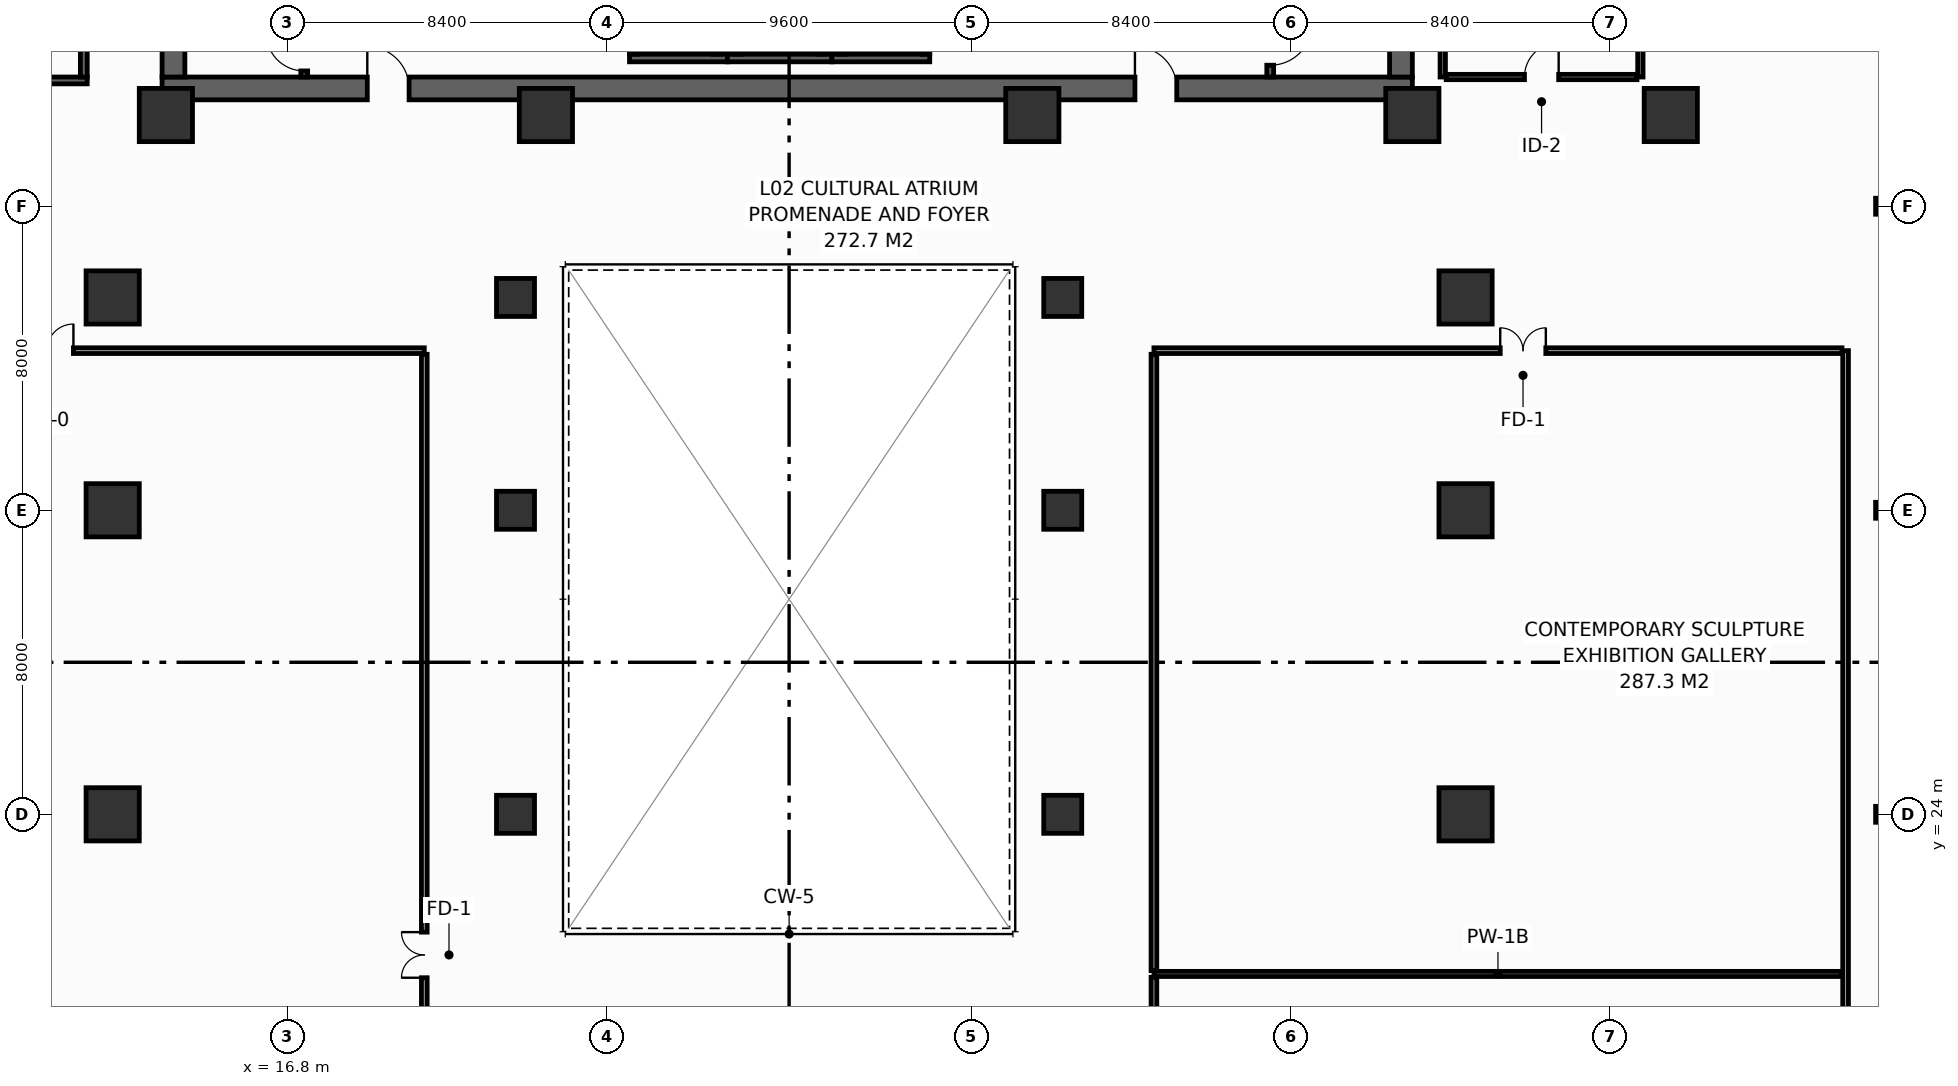
"""IFC4 building model, lengths in metres.
Left out: names, types, materials, properties, quantities, classifications, styles, units other than length and angle.
Written with IfcOpenShell. Run it as: python <this file> out.ifc"""

import sys

from ifc_helpers import new_model, si_unit, direction, frame, frame_2d, origin, origin_2d, place, context, subcontext, project, spatial, rectangle, hollow_rectangle, i_section, extrude, element, fill, save


model = new_model("IFC4")
c1 = context("Model", 3, precision=1e-05, world=origin(), true_north=direction((0.0, 1.0)))
c2 = subcontext(c1, "Body", "Model", "MODEL_VIEW")
j1 = project(units=[si_unit("LENGTHUNIT", "METRE"), si_unit("PLANEANGLEUNIT", "RADIAN")], contexts=[c1])
p1 = place(None, origin())
s1 = spatial("IfcSite", under=j1, at=p1, CompositionType="ELEMENT")
p2 = place(p1, origin())
s2 = spatial("IfcBuilding", under=s1, at=p2, CompositionType="ELEMENT")
p3 = place(p2, frame((0.0, 0.0, 11.4)))
s3 = spatial("IfcBuildingStorey", under=s2, at=p3, CompositionType="ELEMENT", Elevation=11.4)
p4 = place(p3, frame((13.5, 43.1, 0.0), z_axis=(0.0, 0.0, 1.0), x_axis=(1.0, 0.0, 0.0)))
e1 = element("IfcWall", 1, at=p4, inside=s3, PredefinedType="SHEAR", context=c2, shape_type="SweptSolid", body=[
    extrude(rectangle(XDim=32.9, YDim=0.6, at=frame_2d((16.45, 0.0))), origin(), (0.0, 0.0, 1.0), 5.1),
])
p5 = place(p4, frame((5.4, 0.0, 0.0)))
e2 = element("IfcOpeningElement", 2, at=p5, cuts=e1, PredefinedType="OPENING", context=c2, shape_type="SweptSolid", body=[
    extrude(rectangle(XDim=1.1, YDim=2.15, at=frame_2d((0.55, 1.075))), frame((0.0, 0.31, 0.0), z_axis=(0.0, -1.0, 0.0), x_axis=(1.0, 0.0, 0.0)), (0.0, 0.0, 1.0), 0.62),
])
p6 = place(p4, frame((25.6, 0.0, 0.0)))
e3 = element("IfcOpeningElement", 3, at=p6, cuts=e1, PredefinedType="OPENING", context=c2, shape_type="SweptSolid", body=[
    extrude(rectangle(XDim=1.1, YDim=2.15, at=frame_2d((0.55, 1.075))), frame((0.0, 0.31, 0.0), z_axis=(0.0, -1.0, 0.0), x_axis=(1.0, 0.0, 0.0)), (0.0, 0.0, 1.0), 0.62),
])
for number, where, z_axis, x_axis in (
    (4, (13.8, 43.4, 0.0), (0.0, 0.0, 1.0), (0.0, 1.0, 0.0)),
    (5, (46.1, 43.4, 0.0), (0.0, 0.0, 1.0), (0.0, 1.0, 0.0)),
):
    element("IfcWall", number, at=place(p3, frame(where, z_axis=z_axis, x_axis=x_axis)), inside=s3, PredefinedType="SHEAR", context=c2, shape_type="SweptSolid", body=[
        extrude(rectangle(XDim=10.4, YDim=0.6, at=frame_2d((5.2, 0.0))), origin(), (0.0, 0.0, 1.0), 5.1),
    ])
for number, where, z_axis, x_axis in (
    (6, (13.6, 42.4, 0.0), (0.0, 0.0, 1.0), (1.0, 0.0, 0.0)),
    (7, (23.6, 42.4, 0.0), (0.0, 0.0, 1.0), (1.0, 0.0, 0.0)),
    (8, (36.4, 42.4, 0.0), (0.0, 0.0, 1.0), (1.0, 0.0, 0.0)),
    (9, (46.4, 42.4, 0.0), (0.0, 0.0, 1.0), (1.0, 0.0, 0.0)),
    (10, (53.2, 42.4, 0.0), (0.0, 0.0, 1.0), (1.0, 0.0, 0.0)),
    (11, (12.2, 24.0, 0.0), (0.0, 0.0, 1.0), (1.0, 0.0, 0.0)),
):
    element("IfcColumn", number, at=place(p3, frame(where, z_axis=z_axis, x_axis=x_axis)), inside=s3, PredefinedType="COLUMN", context=c2, shape_type="SweptSolid", body=[
        extrude(hollow_rectangle(XDim=1.4, YDim=1.4, WallThickness=0.065, at=origin_2d()), origin(), (0.0, 0.0, 1.0), 5.4),
    ])
for number, where, z_axis, x_axis in (
    (12, (22.8, 24.0, 0.0), (0.0, 0.0, 1.0), (1.0, 0.0, 0.0)),
    (13, (37.2, 24.0, 0.0), (0.0, 0.0, 1.0), (1.0, 0.0, 0.0)),
):
    element("IfcColumn", number, at=place(p3, frame(where, z_axis=z_axis, x_axis=x_axis)), inside=s3, PredefinedType="COLUMN", context=c2, shape_type="SweptSolid", body=[
        extrude(hollow_rectangle(XDim=1.0, YDim=1.0, WallThickness=0.045, at=origin_2d()), origin(), (0.0, 0.0, 1.0), 5.4),
    ])
for number, where, z_axis, x_axis in (
    (14, (47.8, 24.0, 0.0), (0.0, 0.0, 1.0), (1.0, 0.0, 0.0)),
    (15, (12.2, 32.0, 0.0), (0.0, 0.0, 1.0), (1.0, 0.0, 0.0)),
):
    element("IfcColumn", number, at=place(p3, frame(where, z_axis=z_axis, x_axis=x_axis)), inside=s3, PredefinedType="COLUMN", context=c2, shape_type="SweptSolid", body=[
        extrude(hollow_rectangle(XDim=1.4, YDim=1.4, WallThickness=0.065, at=origin_2d()), origin(), (0.0, 0.0, 1.0), 5.4),
    ])
for number, where, z_axis, x_axis in (
    (16, (22.8, 32.0, 0.0), (0.0, 0.0, 1.0), (1.0, 0.0, 0.0)),
    (17, (37.2, 32.0, 0.0), (0.0, 0.0, 1.0), (1.0, 0.0, 0.0)),
):
    element("IfcColumn", number, at=place(p3, frame(where, z_axis=z_axis, x_axis=x_axis)), inside=s3, PredefinedType="COLUMN", context=c2, shape_type="SweptSolid", body=[
        extrude(hollow_rectangle(XDim=1.0, YDim=1.0, WallThickness=0.045, at=origin_2d()), origin(), (0.0, 0.0, 1.0), 5.4),
    ])
for number, where, z_axis, x_axis in (
    (18, (47.8, 32.0, 0.0), (0.0, 0.0, 1.0), (1.0, 0.0, 0.0)),
    (19, (12.2, 37.6, 0.0), (0.0, 0.0, 1.0), (1.0, 0.0, 0.0)),
):
    element("IfcColumn", number, at=place(p3, frame(where, z_axis=z_axis, x_axis=x_axis)), inside=s3, PredefinedType="COLUMN", context=c2, shape_type="SweptSolid", body=[
        extrude(hollow_rectangle(XDim=1.4, YDim=1.4, WallThickness=0.065, at=origin_2d()), origin(), (0.0, 0.0, 1.0), 5.4),
    ])
for number, where, z_axis, x_axis in (
    (20, (22.8, 37.6, 0.0), (0.0, 0.0, 1.0), (1.0, 0.0, 0.0)),
    (21, (37.2, 37.6, 0.0), (0.0, 0.0, 1.0), (1.0, 0.0, 0.0)),
):
    element("IfcColumn", number, at=place(p3, frame(where, z_axis=z_axis, x_axis=x_axis)), inside=s3, PredefinedType="COLUMN", context=c2, shape_type="SweptSolid", body=[
        extrude(hollow_rectangle(XDim=1.0, YDim=1.0, WallThickness=0.045, at=origin_2d()), origin(), (0.0, 0.0, 1.0), 5.4),
    ])
p7 = place(p3, frame((47.8, 37.6, 0.0), z_axis=(0.0, 0.0, 1.0), x_axis=(1.0, 0.0, 0.0)))
e22 = element("IfcColumn", 22, at=p7, inside=s3, PredefinedType="COLUMN", context=c2, shape_type="SweptSolid", body=[
    extrude(hollow_rectangle(XDim=1.4, YDim=1.4, WallThickness=0.065, at=origin_2d()), origin(), (0.0, 0.0, 1.0), 5.4),
])
for number, where, z_axis, x_axis in (
    (23, (58.8, 24.0, 0.0), (0.0, 0.0, 1.0), (1.0, 0.0, 0.0)),
    (24, (58.8, 32.0, 0.0), (0.0, 0.0, 1.0), (1.0, 0.0, 0.0)),
    (25, (58.8, 40.0, 0.0), (0.0, 0.0, 1.0), (1.0, 0.0, 0.0)),
):
    element("IfcColumn", number, at=place(p3, frame(where, z_axis=z_axis, x_axis=x_axis)), inside=s3, PredefinedType="COLUMN", context=c2, shape_type="SweptSolid", body=[
        extrude(i_section(OverallWidth=0.42, OverallDepth=0.42, WebThickness=0.02, FlangeThickness=0.035, FilletRadius=0.022, at=origin_2d()), origin(), (0.0, 0.0, 1.0), 5.4),
    ])
p8 = place(p3, frame((25.8, 43.9, 0.0), z_axis=(0.0, 0.0, 1.0), x_axis=(1.0, 0.0, 0.0)))
e26 = element("IfcWall", 26, at=p8, inside=s3, PredefinedType="SHEAR", context=c2, shape_type="SweptSolid", body=[
    extrude(rectangle(XDim=2.575, YDim=0.2, at=frame_2d((1.288, 0.0))), origin(), (0.0, 0.0, 1.0), 5.1),
])
for number, where, z_axis, x_axis in (
    (27, (25.9, 44.0, 0.0), (0.0, 0.0, 1.0), (0.0, 1.0, 0.0)),
    (28, (28.1, 44.0, 0.0), (0.0, 0.0, 1.0), (0.0, 1.0, 0.0)),
):
    element("IfcWall", number, at=place(p3, frame(where, z_axis=z_axis, x_axis=x_axis)), inside=s3, PredefinedType="SHEAR", context=c2, shape_type="SweptSolid", body=[
        extrude(rectangle(XDim=2.3, YDim=0.2, at=frame_2d((1.15, 0.0))), origin(), (0.0, 0.0, 1.0), 5.1),
    ])
p9 = place(p3, frame((28.375, 43.9, 0.0), z_axis=(0.0, 0.0, 1.0), x_axis=(1.0, 0.0, 0.0)))
e29 = element("IfcWall", 29, at=p9, inside=s3, PredefinedType="SHEAR", context=c2, shape_type="SweptSolid", body=[
    extrude(rectangle(XDim=2.75, YDim=0.2, at=frame_2d((1.375, 0.0))), origin(), (0.0, 0.0, 1.0), 5.1),
])
for number, where, z_axis, x_axis in (
    (30, (28.65, 44.0, 0.0), (0.0, 0.0, 1.0), (0.0, 1.0, 0.0)),
    (31, (30.85, 44.0, 0.0), (0.0, 0.0, 1.0), (0.0, 1.0, 0.0)),
):
    element("IfcWall", number, at=place(p3, frame(where, z_axis=z_axis, x_axis=x_axis)), inside=s3, PredefinedType="SHEAR", context=c2, shape_type="SweptSolid", body=[
        extrude(rectangle(XDim=2.3, YDim=0.2, at=frame_2d((1.15, 0.0))), origin(), (0.0, 0.0, 1.0), 5.1),
    ])
p10 = place(p3, frame((31.125, 43.9, 0.0), z_axis=(0.0, 0.0, 1.0), x_axis=(1.0, 0.0, 0.0)))
e32 = element("IfcWall", 32, at=p10, inside=s3, PredefinedType="SHEAR", context=c2, shape_type="SweptSolid", body=[
    extrude(rectangle(XDim=2.575, YDim=0.2, at=frame_2d((1.288, 0.0))), origin(), (0.0, 0.0, 1.0), 5.1),
])
for number, where, z_axis, x_axis in (
    (33, (31.4, 44.0, 0.0), (0.0, 0.0, 1.0), (0.0, 1.0, 0.0)),
    (34, (33.6, 44.0, 0.0), (0.0, 0.0, 1.0), (0.0, 1.0, 0.0)),
):
    element("IfcWall", number, at=place(p3, frame(where, z_axis=z_axis, x_axis=x_axis)), inside=s3, PredefinedType="SHEAR", context=c2, shape_type="SweptSolid", body=[
        extrude(rectangle(XDim=2.3, YDim=0.2, at=frame_2d((1.15, 0.0))), origin(), (0.0, 0.0, 1.0), 5.1),
    ])
p11 = place(p3, frame((17.24, 43.4, 0.0), z_axis=(0.0, 0.0, 1.0), x_axis=(0.0, 1.0, 0.0)))
e35 = element("IfcWall", 35, at=p11, inside=s3, PredefinedType="SHEAR", context=c2, shape_type="SweptSolid", body=[
    extrude(rectangle(XDim=10.4, YDim=0.18, at=frame_2d((5.2, 0.0))), origin(), (0.0, 0.0, 1.0), 5.1),
])
p12 = place(p11, frame((0.16, 0.0, 0.0)))
e36 = element("IfcOpeningElement", 36, at=p12, cuts=e35, PredefinedType="OPENING", context=c2, shape_type="SweptSolid", body=[
    extrude(rectangle(XDim=1.0, YDim=2.15, at=frame_2d((0.5, 1.075))), frame((0.0, 0.1, 0.0), z_axis=(0.0, -1.0, 0.0), x_axis=(1.0, 0.0, 0.0)), (0.0, 0.0, 1.0), 0.2),
])
p13 = place(p3, frame((42.66, 53.8, 0.0), z_axis=(0.0, 0.0, 1.0), x_axis=(0.0, -1.0, 0.0)))
e37 = element("IfcWall", 37, at=p13, inside=s3, PredefinedType="SHEAR", context=c2, shape_type="SweptSolid", body=[
    extrude(rectangle(XDim=10.4, YDim=0.18, at=frame_2d((5.2, 0.0))), origin(), (0.0, 0.0, 1.0), 5.1),
])
p14 = place(p13, frame((8.99, 0.0, 0.0)))
e38 = element("IfcOpeningElement", 38, at=p14, cuts=e37, PredefinedType="OPENING", context=c2, shape_type="SweptSolid", body=[
    extrude(rectangle(XDim=1.1, YDim=2.15, at=frame_2d((0.55, 1.075))), frame((0.0, 0.1, 0.0), z_axis=(0.0, -1.0, 0.0), x_axis=(1.0, 0.0, 0.0)), (0.0, 0.0, 1.0), 0.2),
])
p15 = place(p3, frame((8.12, 43.31, 0.0), z_axis=(0.0, 0.0, 1.0), x_axis=(1.0, 0.0, 0.0)))
e39 = element("IfcWall", 39, at=p15, inside=s3, PredefinedType="SHEAR", context=c2, shape_type="SweptSolid", body=[
    extrude(rectangle(XDim=3.41, YDim=0.18, at=frame_2d((1.705, 0.0))), origin(), (0.0, 0.0, 1.0), 5.1),
])
p16 = place(p15, frame((1.15, 0.0, 0.0)))
e40 = element("IfcOpeningElement", 40, at=p16, cuts=e39, PredefinedType="OPENING", context=c2, shape_type="SweptSolid", body=[
    extrude(rectangle(XDim=1.1, YDim=2.15, at=frame_2d((0.55, 1.075))), frame((0.0, 0.1, 0.0), z_axis=(0.0, -1.0, 0.0), x_axis=(1.0, 0.0, 0.0)), (0.0, 0.0, 1.0), 0.2),
])
p17 = place(p3, frame((11.44, 43.4, 0.0), z_axis=(0.0, 0.0, 1.0), x_axis=(0.0, 1.0, 0.0)))
e41 = element("IfcWall", 41, at=p17, inside=s3, PredefinedType="SHEAR", context=c2, shape_type="SweptSolid", body=[
    extrude(rectangle(XDim=10.4, YDim=0.18, at=frame_2d((5.2, 0.0))), origin(), (0.0, 0.0, 1.0), 5.1),
])
p18 = place(p3, frame((2.295, 36.2, 0.0), z_axis=(0.0, 0.0, 1.0), x_axis=(1.0, 0.0, 0.0)))
e42 = element("IfcWall", 42, at=p18, inside=s3, PredefinedType="PARTITIONING", context=c2, shape_type="SweptSolid", body=[
    extrude(rectangle(XDim=18.105, YDim=0.15, at=frame_2d((9.052, 0.0))), origin(), (0.0, 0.0, 1.0), 4.185),
])
p19 = place(p18, frame((7.472, 0.0, 0.0)))
e43 = element("IfcOpeningElement", 43, at=p19, cuts=e42, PredefinedType="OPENING", context=c2, shape_type="SweptSolid", body=[
    extrude(rectangle(XDim=1.4, YDim=2.2, at=frame_2d((0.7, 1.1))), frame((0.0, 0.085, 0.0), z_axis=(0.0, -1.0, 0.0), x_axis=(1.0, 0.0, 0.0)), (0.0, 0.0, 1.0), 0.17),
])
p20 = place(p3, frame((20.4, 4.495, 0.0), z_axis=(0.0, 0.0, 1.0), x_axis=(0.0, 1.0, 0.0)))
e44 = element("IfcWall", 44, at=p20, inside=s3, PredefinedType="PARTITIONING", context=c2, shape_type="SweptSolid", body=[
    extrude(rectangle(XDim=31.61, YDim=0.15, at=frame_2d((15.805, 0.0))), origin(), (0.0, 0.0, 1.0), 4.185),
])
p21 = place(p20, frame((15.205, 0.0, 0.0)))
e45 = element("IfcOpeningElement", 45, at=p21, cuts=e44, PredefinedType="OPENING", context=c2, shape_type="SweptSolid", body=[
    extrude(rectangle(XDim=1.2, YDim=2.15, at=frame_2d((0.6, 1.075))), frame((0.0, 0.085, 0.0), z_axis=(0.0, -1.0, 0.0), x_axis=(1.0, 0.0, 0.0)), (0.0, 0.0, 1.0), 0.17),
])
p22 = place(p3, frame((57.8, 4.4, 0.0), z_axis=(0.0, 0.0, 1.0), x_axis=(0.0, 1.0, 0.0)))
e46 = element("IfcWall", 46, at=p22, inside=s3, PredefinedType="PARTITIONING", context=c2, shape_type="SweptSolid", body=[
    extrude(rectangle(XDim=31.8, YDim=0.15, at=frame_2d((15.9, 0.0))), origin(), (0.0, 0.0, 1.0), 4.185),
])
p23 = place(p3, frame((39.6, 19.8, 0.0), z_axis=(0.0, 0.0, 1.0), x_axis=(1.0, 0.0, 0.0)))
e47 = element("IfcWall", 47, at=p23, inside=s3, PredefinedType="PARTITIONING", context=c2, shape_type="SweptSolid", body=[
    extrude(rectangle(XDim=18.105, YDim=0.135, at=frame_2d((9.052, 0.0))), origin(), (0.0, 0.0, 1.0), 4.185),
])
p24 = place(p3, frame((39.6, 36.2, 0.0), z_axis=(0.0, 0.0, 1.0), x_axis=(1.0, 0.0, 0.0)))
e48 = element("IfcWall", 48, at=p24, inside=s3, PredefinedType="PARTITIONING", context=c2, shape_type="SweptSolid", body=[
    extrude(rectangle(XDim=18.105, YDim=0.15, at=frame_2d((9.052, 0.0))), origin(), (0.0, 0.0, 1.0), 4.185),
])
p25 = place(p24, frame((9.112, 0.0, 0.0)))
e49 = element("IfcOpeningElement", 49, at=p25, cuts=e48, PredefinedType="OPENING", context=c2, shape_type="SweptSolid", body=[
    extrude(rectangle(XDim=1.2, YDim=2.15, at=frame_2d((0.6, 1.075))), frame((0.0, 0.085, 0.0), z_axis=(0.0, -1.0, 0.0), x_axis=(1.0, 0.0, 0.0)), (0.0, 0.0, 1.0), 0.17),
])
p26 = place(p3, frame((39.6, 4.495, 0.0), z_axis=(0.0, 0.0, 1.0), x_axis=(0.0, 1.0, 0.0)))
e50 = element("IfcWall", 50, at=p26, inside=s3, PredefinedType="PARTITIONING", context=c2, shape_type="SweptSolid", body=[
    extrude(rectangle(XDim=15.217, YDim=0.15, at=frame_2d((7.609, 0.0))), origin(), (0.0, 0.0, 1.0), 4.185),
])
p27 = place(p26, frame((7.084, 0.0, 0.0)))
e51 = element("IfcOpeningElement", 51, at=p27, cuts=e50, PredefinedType="OPENING", context=c2, shape_type="SweptSolid", body=[
    extrude(rectangle(XDim=1.05, YDim=2.15, at=frame_2d((0.525, 1.075))), frame((0.0, 0.085, 0.0), z_axis=(0.0, -1.0, 0.0), x_axis=(1.0, 0.0, 0.0)), (0.0, 0.0, 1.0), 0.17),
])
p28 = place(p3, frame((39.6, 19.887, 0.0), z_axis=(0.0, 0.0, 1.0), x_axis=(0.0, 1.0, 0.0)))
e52 = element("IfcWall", 52, at=p28, inside=s3, PredefinedType="PARTITIONING", context=c2, shape_type="SweptSolid", body=[
    extrude(rectangle(XDim=16.218, YDim=0.15, at=frame_2d((8.109, 0.0))), origin(), (0.0, 0.0, 1.0), 4.185),
])
p29 = place(p3, frame((47.2, 43.4, 0.0), z_axis=(0.0, 0.0, 1.0), x_axis=(0.0, 1.0, 0.0)))
e53 = element("IfcWall", 53, at=p29, inside=s3, PredefinedType="PARTITIONING", context=c2, shape_type="SweptSolid", body=[
    extrude(rectangle(XDim=4.8, YDim=0.14, at=frame_2d((2.4, 0.0))), origin(), (0.0, 0.0, 1.0), 5.1),
])
p30 = place(p3, frame((52.4, 43.4, 0.0), z_axis=(0.0, 0.0, 1.0), x_axis=(0.0, 1.0, 0.0)))
e54 = element("IfcWall", 54, at=p30, inside=s3, PredefinedType="PARTITIONING", context=c2, shape_type="SweptSolid", body=[
    extrude(rectangle(XDim=4.71, YDim=0.14, at=frame_2d((2.355, 0.0))), origin(), (0.0, 0.0, 1.0), 5.1),
])
p31 = place(p3, frame((47.29, 43.4, 0.0), z_axis=(0.0, 0.0, 1.0), x_axis=(1.0, 0.0, 0.0)))
e55 = element("IfcWall", 55, at=p31, inside=s3, PredefinedType="PARTITIONING", context=c2, shape_type="SweptSolid", body=[
    extrude(rectangle(XDim=5.02, YDim=0.14, at=frame_2d((2.51, 0.0))), origin(), (0.0, 0.0, 1.0), 5.1),
])
p32 = place(p31, frame((2.06, 0.0, 0.0)))
e56 = element("IfcOpeningElement", 56, at=p32, cuts=e55, PredefinedType="OPENING", context=c2, shape_type="SweptSolid", body=[
    extrude(rectangle(XDim=0.9, YDim=2.1, at=frame_2d((0.45, 1.05))), frame((0.0, 0.08, 0.0), z_axis=(0.0, -1.0, 0.0), x_axis=(1.0, 0.0, 0.0)), (0.0, 0.0, 1.0), 0.16),
])
p33 = place(p12, origin())
e57 = element("IfcDoor", 57, at=p33, inside=s3, OperationType="SINGLE_SWING_RIGHT", PredefinedType="DOOR", context=c2, shape_type="SweptSolid", body=[
    extrude(rectangle(XDim=1.0, YDim=2.15, at=frame_2d((0.5, 1.075))), frame((0.0, 0.025, 0.0), z_axis=(0.0, -1.0, 0.0), x_axis=(1.0, 0.0, 0.0)), (0.0, 0.0, 1.0), 0.05),
])
fill(e36, e57)
p34 = place(p14, origin())
e58 = element("IfcDoor", 58, at=p34, inside=s3, OperationType="SINGLE_SWING_LEFT", PredefinedType="DOOR", context=c2, shape_type="SweptSolid", body=[
    extrude(rectangle(XDim=1.1, YDim=2.15, at=frame_2d((0.55, 1.075))), frame((0.0, 0.025, 0.0), z_axis=(0.0, -1.0, 0.0), x_axis=(1.0, 0.0, 0.0)), (0.0, 0.0, 1.0), 0.05),
])
fill(e38, e58)
p35 = place(p5, origin())
e59 = element("IfcDoor", 59, at=p35, inside=s3, OperationType="SINGLE_SWING_LEFT", PredefinedType="DOOR", context=c2, shape_type="SweptSolid", body=[
    extrude(rectangle(XDim=1.1, YDim=2.15, at=frame_2d((0.55, 1.075))), frame((0.0, 0.025, 0.0), z_axis=(0.0, -1.0, 0.0), x_axis=(1.0, 0.0, 0.0)), (0.0, 0.0, 1.0), 0.05),
])
fill(e2, e59)
p36 = place(p6, origin())
e60 = element("IfcDoor", 60, at=p36, inside=s3, OperationType="SINGLE_SWING_LEFT", PredefinedType="DOOR", context=c2, shape_type="SweptSolid", body=[
    extrude(rectangle(XDim=1.1, YDim=2.15, at=frame_2d((0.55, 1.075))), frame((0.0, 0.025, 0.0), z_axis=(0.0, -1.0, 0.0), x_axis=(1.0, 0.0, 0.0)), (0.0, 0.0, 1.0), 0.05),
])
fill(e3, e60)
p37 = place(p19, origin())
e61 = element("IfcDoor", 61, at=p37, inside=s3, OperationType="DOUBLE_DOOR_SINGLE_SWING", PredefinedType="DOOR", context=c2, shape_type="SweptSolid", body=[
    extrude(rectangle(XDim=1.4, YDim=2.2, at=frame_2d((0.7, 1.1))), frame((0.0, 0.025, 0.0), z_axis=(0.0, -1.0, 0.0), x_axis=(1.0, 0.0, 0.0)), (0.0, 0.0, 1.0), 0.05),
])
fill(e43, e61)
p38 = place(p21, origin())
e62 = element("IfcDoor", 62, at=p38, inside=s3, OperationType="DOUBLE_DOOR_SINGLE_SWING", PredefinedType="DOOR", context=c2, shape_type="SweptSolid", body=[
    extrude(rectangle(XDim=1.2, YDim=2.15, at=frame_2d((0.6, 1.075))), frame((0.0, 0.025, 0.0), z_axis=(0.0, -1.0, 0.0), x_axis=(1.0, 0.0, 0.0)), (0.0, 0.0, 1.0), 0.05),
])
fill(e45, e62)
p39 = place(p25, origin())
e63 = element("IfcDoor", 63, at=p39, inside=s3, OperationType="DOUBLE_DOOR_SINGLE_SWING", PredefinedType="DOOR", context=c2, shape_type="SweptSolid", body=[
    extrude(rectangle(XDim=1.2, YDim=2.15, at=frame_2d((0.6, 1.075))), frame((0.0, 0.025, 0.0), z_axis=(0.0, -1.0, 0.0), x_axis=(1.0, 0.0, 0.0)), (0.0, 0.0, 1.0), 0.05),
])
fill(e49, e63)
p40 = place(p32, origin())
e64 = element("IfcDoor", 64, at=p40, inside=s3, OperationType="SINGLE_SWING_RIGHT", PredefinedType="DOOR", context=c2, shape_type="SweptSolid", body=[
    extrude(rectangle(XDim=0.9, YDim=2.1, at=frame_2d((0.45, 1.05))), frame((0.0, 0.025, 0.0), z_axis=(0.0, -1.0, 0.0), x_axis=(1.0, 0.0, 0.0)), (0.0, 0.0, 1.0), 0.05),
])
fill(e56, e64)
save(model, sys.argv[1])
